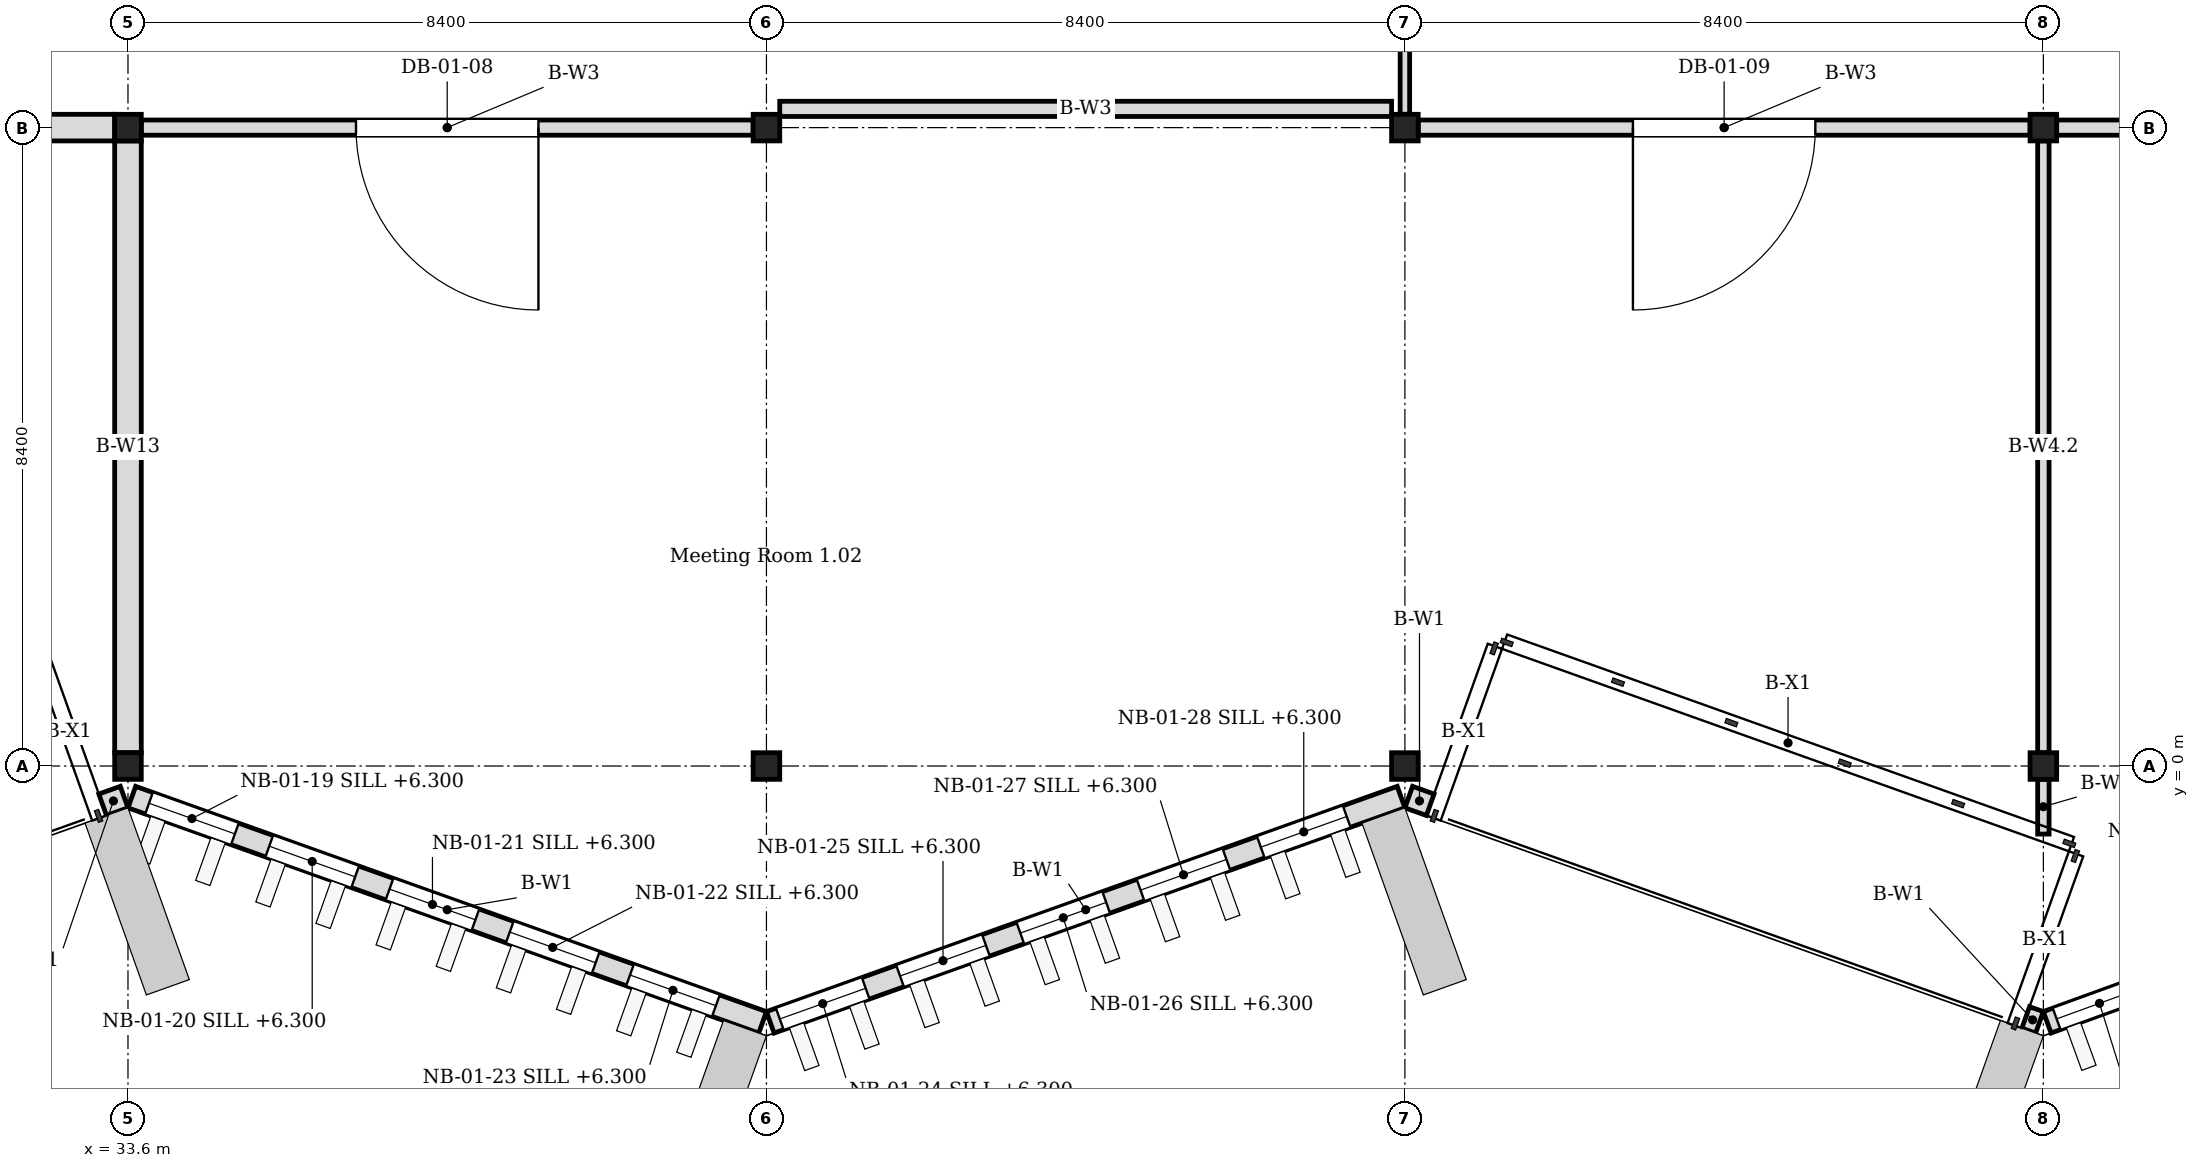
"""IFC4 building model, lengths in metres.
Left out: names, types, materials, properties, quantities, classifications, styles, units other than length and angle.
Written with IfcOpenShell. Run it as: python <this file> out.ifc"""

import sys

from ifc_helpers import new_model, si_unit, direction, frame, frame_2d, origin, origin_2d, place, context, subcontext, project, spatial, rectangle, i_section, extrude, element, fill, save


model = new_model("IFC4")
c1 = context("Model", 3, precision=1e-05, world=origin(), true_north=direction((0.0, 1.0)))
c2 = subcontext(c1, "Body", "Model", "MODEL_VIEW")
j1 = project(units=[si_unit("LENGTHUNIT", "METRE"), si_unit("PLANEANGLEUNIT", "RADIAN")], contexts=[c1])
p1 = place(None, origin())
s1 = spatial("IfcSite", under=j1, at=p1, CompositionType="ELEMENT")
p2 = place(p1, origin())
s2 = spatial("IfcBuilding", under=s1, at=p2, CompositionType="ELEMENT")
p3 = place(p2, frame((0.0, 0.0, 6.0)))
s3 = spatial("IfcBuildingStorey", under=s2, at=p3, CompositionType="ELEMENT", Elevation=6.0)
for number, where, z_axis, x_axis in (
    (1, (33.6, 0.0, 0.0), (0.0, 0.0, 1.0), (1.0, 0.0, 0.0)),
    (2, (33.6, 8.4, 0.0), (0.0, 0.0, 1.0), (1.0, 0.0, 0.0)),
    (3, (42.0, 0.0, 0.0), (0.0, 0.0, 1.0), (1.0, 0.0, 0.0)),
    (4, (42.0, 8.4, 0.0), (0.0, 0.0, 1.0), (1.0, 0.0, 0.0)),
    (5, (50.4, 0.0, 0.0), (0.0, 0.0, 1.0), (1.0, 0.0, 0.0)),
    (6, (50.4, 8.4, 0.0), (0.0, 0.0, 1.0), (1.0, 0.0, 0.0)),
    (7, (58.8, 0.0, 0.0), (0.0, 0.0, 1.0), (1.0, 0.0, 0.0)),
    (8, (58.8, 8.4, 0.0), (0.0, 0.0, 1.0), (1.0, 0.0, 0.0)),
):
    element("IfcColumn", number, at=place(p3, frame(where, z_axis=z_axis, x_axis=x_axis)), inside=s3, PredefinedType="COLUMN", context=c2, shape_type="SweptSolid", body=[
        extrude(i_section(OverallWidth=0.35, OverallDepth=0.35, WebThickness=0.012, FlangeThickness=0.019, FilletRadius=0.013, at=origin_2d()), origin(), (0.0, 0.0, 1.0), 4.2),
    ])
p4 = place(p3, frame((33.267, -0.51, 0.0), z_axis=(0.0, 0.0, 1.0), x_axis=(0.941797147708, 0.336181695768, 0.0)))
e9 = element("IfcWall", 9, at=p4, inside=s3, PredefinedType="SOLIDWALL", context=c2, shape_type="SweptSolid", body=[
    extrude(rectangle(XDim=0.3, YDim=0.3, at=frame_2d((0.15, 0.0))), origin(), (0.0, 0.0, 1.0), 4.05),
])
p5 = place(p3, frame((33.65, -0.409, 0.0), z_axis=(0.0, 0.0, 1.0), x_axis=(0.941736270411, -0.336352191894, 0.0)))
e10 = element("IfcWall", 10, at=p5, inside=s3, PredefinedType="SOLIDWALL", context=c2, shape_type="SweptSolid", body=[
    extrude(rectangle(XDim=8.812, YDim=0.3, at=frame_2d((4.406, 0.0))), origin(), (0.0, 0.0, 1.0), 4.05),
])
p6 = place(p5, frame((0.24, 0.0, 0.3)))
e11 = element("IfcOpeningElement", 11, at=p6, cuts=e10, PredefinedType="OPENING", context=c2, shape_type="SweptSolid", body=[
    extrude(rectangle(XDim=1.2, YDim=3.3, at=frame_2d((0.6, 1.65))), frame((0.0, 0.16, 0.0), z_axis=(0.0, -1.0, 0.0), x_axis=(1.0, 0.0, 0.0)), (0.0, 0.0, 1.0), 0.32),
])
p7 = place(p5, frame((1.92, 0.0, 0.3)))
e12 = element("IfcOpeningElement", 12, at=p7, cuts=e10, PredefinedType="OPENING", context=c2, shape_type="SweptSolid", body=[
    extrude(rectangle(XDim=1.2, YDim=3.3, at=frame_2d((0.6, 1.65))), frame((0.0, 0.16, 0.0), z_axis=(0.0, -1.0, 0.0), x_axis=(1.0, 0.0, 0.0)), (0.0, 0.0, 1.0), 0.32),
])
p8 = place(p5, frame((3.6, 0.0, 0.3)))
e13 = element("IfcOpeningElement", 13, at=p8, cuts=e10, PredefinedType="OPENING", context=c2, shape_type="SweptSolid", body=[
    extrude(rectangle(XDim=1.2, YDim=3.3, at=frame_2d((0.6, 1.65))), frame((0.0, 0.16, 0.0), z_axis=(0.0, -1.0, 0.0), x_axis=(1.0, 0.0, 0.0)), (0.0, 0.0, 1.0), 0.32),
])
p9 = place(p5, frame((5.28, 0.0, 0.3)))
e14 = element("IfcOpeningElement", 14, at=p9, cuts=e10, PredefinedType="OPENING", context=c2, shape_type="SweptSolid", body=[
    extrude(rectangle(XDim=1.2, YDim=3.3, at=frame_2d((0.6, 1.65))), frame((0.0, 0.16, 0.0), z_axis=(0.0, -1.0, 0.0), x_axis=(1.0, 0.0, 0.0)), (0.0, 0.0, 1.0), 0.32),
])
p10 = place(p5, frame((6.96, 0.0, 0.3)))
e15 = element("IfcOpeningElement", 15, at=p10, cuts=e10, PredefinedType="OPENING", context=c2, shape_type="SweptSolid", body=[
    extrude(rectangle(XDim=1.2, YDim=3.3, at=frame_2d((0.6, 1.65))), frame((0.0, 0.16, 0.0), z_axis=(0.0, -1.0, 0.0), x_axis=(1.0, 0.0, 0.0)), (0.0, 0.0, 1.0), 0.32),
])
p11 = place(p3, frame((42.051, -3.373, 0.0), z_axis=(0.0, 0.0, 1.0), x_axis=(0.941736270411, 0.336352191894, 0.0)))
e16 = element("IfcWall", 16, at=p11, inside=s3, PredefinedType="SOLIDWALL", context=c2, shape_type="SweptSolid", body=[
    extrude(rectangle(XDim=8.812, YDim=0.3, at=frame_2d((4.406, 0.0))), origin(), (0.0, 0.0, 1.0), 4.05),
])
p12 = place(p11, frame((0.133, 0.0, 0.3)))
e17 = element("IfcOpeningElement", 17, at=p12, cuts=e16, PredefinedType="OPENING", context=c2, shape_type="SweptSolid", body=[
    extrude(rectangle(XDim=1.2, YDim=3.3, at=frame_2d((0.6, 1.65))), frame((0.0, 0.16, 0.0), z_axis=(0.0, -1.0, 0.0), x_axis=(1.0, 0.0, 0.0)), (0.0, 0.0, 1.0), 0.32),
])
p13 = place(p11, frame((1.813, 0.0, 0.3)))
e18 = element("IfcOpeningElement", 18, at=p13, cuts=e16, PredefinedType="OPENING", context=c2, shape_type="SweptSolid", body=[
    extrude(rectangle(XDim=1.2, YDim=3.3, at=frame_2d((0.6, 1.65))), frame((0.0, 0.16, 0.0), z_axis=(0.0, -1.0, 0.0), x_axis=(1.0, 0.0, 0.0)), (0.0, 0.0, 1.0), 0.32),
])
p14 = place(p11, frame((3.493, 0.0, 0.3)))
e19 = element("IfcOpeningElement", 19, at=p14, cuts=e16, PredefinedType="OPENING", context=c2, shape_type="SweptSolid", body=[
    extrude(rectangle(XDim=1.2, YDim=3.3, at=frame_2d((0.6, 1.65))), frame((0.0, 0.16, 0.0), z_axis=(0.0, -1.0, 0.0), x_axis=(1.0, 0.0, 0.0)), (0.0, 0.0, 1.0), 0.32),
])
p15 = place(p11, frame((5.173, 0.0, 0.3)))
e20 = element("IfcOpeningElement", 20, at=p15, cuts=e16, PredefinedType="OPENING", context=c2, shape_type="SweptSolid", body=[
    extrude(rectangle(XDim=1.2, YDim=3.3, at=frame_2d((0.6, 1.65))), frame((0.0, 0.16, 0.0), z_axis=(0.0, -1.0, 0.0), x_axis=(1.0, 0.0, 0.0)), (0.0, 0.0, 1.0), 0.32),
])
p16 = place(p11, frame((6.853, 0.0, 0.3)))
e21 = element("IfcOpeningElement", 21, at=p16, cuts=e16, PredefinedType="OPENING", context=c2, shape_type="SweptSolid", body=[
    extrude(rectangle(XDim=1.2, YDim=3.3, at=frame_2d((0.6, 1.65))), frame((0.0, 0.16, 0.0), z_axis=(0.0, -1.0, 0.0), x_axis=(1.0, 0.0, 0.0)), (0.0, 0.0, 1.0), 0.32),
])
p17 = place(p3, frame((50.45, -0.409, 0.0), z_axis=(0.0, 0.0, 1.0), x_axis=(0.941797147708, -0.336181695768, 0.0)))
e22 = element("IfcWall", 22, at=p17, inside=s3, PredefinedType="SOLIDWALL", context=c2, shape_type="SweptSolid", body=[
    extrude(rectangle(XDim=0.3, YDim=0.3, at=frame_2d((0.15, 0.0))), origin(), (0.0, 0.0, 1.0), 4.05),
])
p18 = place(p3, frame((58.568, -3.308, 0.0), z_axis=(0.0, 0.0, 1.0), x_axis=(0.942000485661, -0.335611509061, 0.0)))
e23 = element("IfcWall", 23, at=p18, inside=s3, PredefinedType="SOLIDWALL", context=c2, shape_type="SweptSolid", body=[
    extrude(rectangle(XDim=0.192, YDim=0.3, at=frame_2d((0.096, 0.0))), origin(), (0.0, 0.0, 1.0), 4.05),
])
p19 = place(p3, frame((58.85, -3.372, 0.0), z_axis=(0.0, 0.0, 1.0), x_axis=(0.939953187971, 0.341303390584, 0.0)))
e24 = element("IfcWall", 24, at=p19, inside=s3, PredefinedType="SOLIDWALL", context=c2, shape_type="SweptSolid", body=[
    extrude(rectangle(XDim=8.828, YDim=0.3, at=frame_2d((4.414, 0.0))), origin(), (0.0, 0.0, 1.0), 4.05),
])
p20 = place(p19, frame((0.132, 0.0, 0.3)))
e25 = element("IfcOpeningElement", 25, at=p20, cuts=e24, PredefinedType="OPENING", context=c2, shape_type="SweptSolid", body=[
    extrude(rectangle(XDim=1.2, YDim=3.3, at=frame_2d((0.6, 1.65))), frame((0.0, 0.16, 0.0), z_axis=(0.0, -1.0, 0.0), x_axis=(1.0, 0.0, 0.0)), (0.0, 0.0, 1.0), 0.32),
])
p21 = place(p19, frame((1.812, 0.0, 0.3)))
e26 = element("IfcOpeningElement", 26, at=p21, cuts=e24, PredefinedType="OPENING", context=c2, shape_type="SweptSolid", body=[
    extrude(rectangle(XDim=1.2, YDim=3.3, at=frame_2d((0.6, 1.65))), frame((0.0, 0.16, 0.0), z_axis=(0.0, -1.0, 0.0), x_axis=(1.0, 0.0, 0.0)), (0.0, 0.0, 1.0), 0.32),
])
p22 = place(p19, frame((3.492, 0.0, 0.3)))
e27 = element("IfcOpeningElement", 27, at=p22, cuts=e24, PredefinedType="OPENING", context=c2, shape_type="SweptSolid", body=[
    extrude(rectangle(XDim=1.2, YDim=3.3, at=frame_2d((0.6, 1.65))), frame((0.0, 0.16, 0.0), z_axis=(0.0, -1.0, 0.0), x_axis=(1.0, 0.0, 0.0)), (0.0, 0.0, 1.0), 0.32),
])
p23 = place(p19, frame((5.172, 0.0, 0.3)))
e28 = element("IfcOpeningElement", 28, at=p23, cuts=e24, PredefinedType="OPENING", context=c2, shape_type="SweptSolid", body=[
    extrude(rectangle(XDim=1.2, YDim=3.3, at=frame_2d((0.6, 1.65))), frame((0.0, 0.16, 0.0), z_axis=(0.0, -1.0, 0.0), x_axis=(1.0, 0.0, 0.0)), (0.0, 0.0, 1.0), 0.32),
])
p24 = place(p19, frame((6.852, 0.0, 0.3)))
e29 = element("IfcOpeningElement", 29, at=p24, cuts=e24, PredefinedType="OPENING", context=c2, shape_type="SweptSolid", body=[
    extrude(rectangle(XDim=1.2, YDim=3.3, at=frame_2d((0.6, 1.65))), frame((0.0, 0.16, 0.0), z_axis=(0.0, -1.0, 0.0), x_axis=(1.0, 0.0, 0.0)), (0.0, 0.0, 1.0), 0.32),
])
p25 = place(p3, frame((25.375, 8.4, 0.0), z_axis=(0.0, 0.0, 1.0), x_axis=(1.0, 0.0, 0.0)))
e30 = element("IfcWall", 30, at=p25, inside=s3, PredefinedType="PARTITIONING", context=c2, shape_type="SweptSolid", body=[
    extrude(rectangle(XDim=8.05, YDim=0.35, at=frame_2d((4.025, 0.0))), origin(), (0.0, 0.0, 1.0), 3.35),
])
p26 = place(p25, frame((3.475, 0.0, 0.0)))
e31 = element("IfcOpeningElement", 31, at=p26, cuts=e30, PredefinedType="OPENING", context=c2, shape_type="SweptSolid", body=[
    extrude(rectangle(XDim=1.1, YDim=2.4, at=frame_2d((0.55, 1.2))), frame((0.0, 0.185, 0.0), z_axis=(0.0, -1.0, 0.0), x_axis=(1.0, 0.0, 0.0)), (0.0, 0.0, 1.0), 0.37),
])
p27 = place(p3, frame((33.775, 8.4, 0.0), z_axis=(0.0, 0.0, 1.0), x_axis=(1.0, 0.0, 0.0)))
e32 = element("IfcWall", 32, at=p27, inside=s3, PredefinedType="PARTITIONING", context=c2, shape_type="SweptSolid", body=[
    extrude(rectangle(XDim=8.05, YDim=0.2, at=frame_2d((4.025, 0.0))), origin(), (0.0, 0.0, 1.0), 3.35),
])
p28 = place(p27, frame((2.825, 0.0, 0.0)))
e33 = element("IfcOpeningElement", 33, at=p28, cuts=e32, PredefinedType="OPENING", context=c2, shape_type="SweptSolid", body=[
    extrude(rectangle(XDim=2.4, YDim=2.2, at=frame_2d((1.2, 1.1))), frame((0.0, 0.11, 0.0), z_axis=(0.0, -1.0, 0.0), x_axis=(1.0, 0.0, 0.0)), (0.0, 0.0, 1.0), 0.22),
])
p29 = place(p3, frame((42.175, 8.646, 0.0), z_axis=(0.0, 0.0, 1.0), x_axis=(1.0, 0.0, 0.0)))
e34 = element("IfcWall", 34, at=p29, inside=s3, PredefinedType="PARTITIONING", context=c2, shape_type="SweptSolid", body=[
    extrude(rectangle(XDim=8.05, YDim=0.2, at=frame_2d((4.025, 0.0))), origin(), (0.0, 0.0, 1.0), 3.35),
])
p30 = place(p3, frame((50.575, 8.4, 0.0), z_axis=(0.0, 0.0, 1.0), x_axis=(1.0, 0.0, 0.0)))
e35 = element("IfcWall", 35, at=p30, inside=s3, PredefinedType="PARTITIONING", context=c2, shape_type="SweptSolid", body=[
    extrude(rectangle(XDim=8.05, YDim=0.2, at=frame_2d((4.025, 0.0))), origin(), (0.0, 0.0, 1.0), 3.35),
])
p31 = place(p30, frame((2.825, 0.0, 0.0)))
e36 = element("IfcOpeningElement", 36, at=p31, cuts=e35, PredefinedType="OPENING", context=c2, shape_type="SweptSolid", body=[
    extrude(rectangle(XDim=2.4, YDim=2.2, at=frame_2d((1.2, 1.1))), frame((0.0, 0.11, 0.0), z_axis=(0.0, -1.0, 0.0), x_axis=(1.0, 0.0, 0.0)), (0.0, 0.0, 1.0), 0.22),
])
p32 = place(p3, frame((58.975, 8.4, 0.0), z_axis=(0.0, 0.0, 1.0), x_axis=(1.0, 0.0, 0.0)))
e37 = element("IfcWall", 37, at=p32, inside=s3, PredefinedType="PARTITIONING", context=c2, shape_type="SweptSolid", body=[
    extrude(rectangle(XDim=8.05, YDim=0.2, at=frame_2d((4.025, 0.0))), origin(), (0.0, 0.0, 1.0), 3.35),
])
p33 = place(p32, frame((3.525, 0.0, 0.0)))
e38 = element("IfcOpeningElement", 38, at=p33, cuts=e37, PredefinedType="OPENING", context=c2, shape_type="SweptSolid", body=[
    extrude(rectangle(XDim=1.0, YDim=2.1, at=frame_2d((0.5, 1.05))), frame((0.0, 0.11, 0.0), z_axis=(0.0, -1.0, 0.0), x_axis=(1.0, 0.0, 0.0)), (0.0, 0.0, 1.0), 0.22),
])
p34 = place(p3, frame((33.6, 0.175, 0.0), z_axis=(0.0, 0.0, 1.0), x_axis=(0.0, 1.0, 0.0)))
e39 = element("IfcWall", 39, at=p34, inside=s3, PredefinedType="PARTITIONING", context=c2, shape_type="SweptSolid", body=[
    extrude(rectangle(XDim=8.05, YDim=0.35, at=frame_2d((4.025, 0.0))), origin(), (0.0, 0.0, 1.0), 3.35),
])
p35 = place(p3, frame((50.4, 8.575, 0.0), z_axis=(0.0, 0.0, 1.0), x_axis=(0.0, 1.0, 0.0)))
e40 = element("IfcWall", 40, at=p35, inside=s3, PredefinedType="PARTITIONING", context=c2, shape_type="SweptSolid", body=[
    extrude(rectangle(XDim=8.05, YDim=0.125, at=frame_2d((4.025, 0.0))), origin(), (0.0, 0.0, 1.0), 3.35),
])
p36 = place(p35, frame((2.825, 0.0, 0.0)))
e41 = element("IfcOpeningElement", 41, at=p36, cuts=e40, PredefinedType="OPENING", context=c2, shape_type="SweptSolid", body=[
    extrude(rectangle(XDim=2.4, YDim=2.2, at=frame_2d((1.2, 1.1))), frame((0.0, 0.073, 0.0), z_axis=(0.0, -1.0, 0.0), x_axis=(1.0, 0.0, 0.0)), (0.0, 0.0, 1.0), 0.145),
])
p37 = place(p3, frame((58.8, -0.895, 0.0), z_axis=(0.0, 0.0, 1.0), x_axis=(0.0, 1.0, 0.0)))
e42 = element("IfcWall", 42, at=p37, inside=s3, PredefinedType="PARTITIONING", context=c2, shape_type="SweptSolid", body=[
    extrude(rectangle(XDim=0.72, YDim=0.15, at=frame_2d((0.36, 0.0))), origin(), (0.0, 0.0, 1.0), 3.35),
])
p38 = place(p3, frame((58.8, 0.175, 0.0), z_axis=(0.0, 0.0, 1.0), x_axis=(0.0, 1.0, 0.0)))
e43 = element("IfcWall", 43, at=p38, inside=s3, PredefinedType="PARTITIONING", context=c2, shape_type="SweptSolid", body=[
    extrude(rectangle(XDim=8.05, YDim=0.15, at=frame_2d((4.025, 0.0))), origin(), (0.0, 0.0, 1.0), 3.35),
])
p39 = place(p6, origin())
e44 = element("IfcWindow", 44, at=p39, inside=s3, PartitioningType="TRIPLE_PANEL_VERTICAL", PredefinedType="WINDOW", context=c2, shape_type="SweptSolid", body=[
    extrude(rectangle(XDim=1.2, YDim=3.3, at=frame_2d((0.6, 1.65))), frame((0.0, 0.03, 0.0), z_axis=(0.0, -1.0, 0.0), x_axis=(1.0, 0.0, 0.0)), (0.0, 0.0, 1.0), 0.06),
])
fill(e11, e44)
p40 = place(p7, origin())
e45 = element("IfcWindow", 45, at=p40, inside=s3, PartitioningType="TRIPLE_PANEL_VERTICAL", PredefinedType="WINDOW", context=c2, shape_type="SweptSolid", body=[
    extrude(rectangle(XDim=1.2, YDim=3.3, at=frame_2d((0.6, 1.65))), frame((0.0, 0.03, 0.0), z_axis=(0.0, -1.0, 0.0), x_axis=(1.0, 0.0, 0.0)), (0.0, 0.0, 1.0), 0.06),
])
fill(e12, e45)
p41 = place(p8, origin())
e46 = element("IfcWindow", 46, at=p41, inside=s3, PartitioningType="TRIPLE_PANEL_VERTICAL", PredefinedType="WINDOW", context=c2, shape_type="SweptSolid", body=[
    extrude(rectangle(XDim=1.2, YDim=3.3, at=frame_2d((0.6, 1.65))), frame((0.0, 0.03, 0.0), z_axis=(0.0, -1.0, 0.0), x_axis=(1.0, 0.0, 0.0)), (0.0, 0.0, 1.0), 0.06),
])
fill(e13, e46)
p42 = place(p9, origin())
e47 = element("IfcWindow", 47, at=p42, inside=s3, PartitioningType="TRIPLE_PANEL_VERTICAL", PredefinedType="WINDOW", context=c2, shape_type="SweptSolid", body=[
    extrude(rectangle(XDim=1.2, YDim=3.3, at=frame_2d((0.6, 1.65))), frame((0.0, 0.03, 0.0), z_axis=(0.0, -1.0, 0.0), x_axis=(1.0, 0.0, 0.0)), (0.0, 0.0, 1.0), 0.06),
])
fill(e14, e47)
p43 = place(p10, origin())
e48 = element("IfcWindow", 48, at=p43, inside=s3, PartitioningType="TRIPLE_PANEL_VERTICAL", PredefinedType="WINDOW", context=c2, shape_type="SweptSolid", body=[
    extrude(rectangle(XDim=1.2, YDim=3.3, at=frame_2d((0.6, 1.65))), frame((0.0, 0.03, 0.0), z_axis=(0.0, -1.0, 0.0), x_axis=(1.0, 0.0, 0.0)), (0.0, 0.0, 1.0), 0.06),
])
fill(e15, e48)
p44 = place(p12, origin())
e49 = element("IfcWindow", 49, at=p44, inside=s3, PartitioningType="TRIPLE_PANEL_VERTICAL", PredefinedType="WINDOW", context=c2, shape_type="SweptSolid", body=[
    extrude(rectangle(XDim=1.2, YDim=3.3, at=frame_2d((0.6, 1.65))), frame((0.0, 0.03, 0.0), z_axis=(0.0, -1.0, 0.0), x_axis=(1.0, 0.0, 0.0)), (0.0, 0.0, 1.0), 0.06),
])
fill(e17, e49)
p45 = place(p13, origin())
e50 = element("IfcWindow", 50, at=p45, inside=s3, PartitioningType="TRIPLE_PANEL_VERTICAL", PredefinedType="WINDOW", context=c2, shape_type="SweptSolid", body=[
    extrude(rectangle(XDim=1.2, YDim=3.3, at=frame_2d((0.6, 1.65))), frame((0.0, 0.03, 0.0), z_axis=(0.0, -1.0, 0.0), x_axis=(1.0, 0.0, 0.0)), (0.0, 0.0, 1.0), 0.06),
])
fill(e18, e50)
p46 = place(p14, origin())
e51 = element("IfcWindow", 51, at=p46, inside=s3, PartitioningType="TRIPLE_PANEL_VERTICAL", PredefinedType="WINDOW", context=c2, shape_type="SweptSolid", body=[
    extrude(rectangle(XDim=1.2, YDim=3.3, at=frame_2d((0.6, 1.65))), frame((0.0, 0.03, 0.0), z_axis=(0.0, -1.0, 0.0), x_axis=(1.0, 0.0, 0.0)), (0.0, 0.0, 1.0), 0.06),
])
fill(e19, e51)
p47 = place(p15, origin())
e52 = element("IfcWindow", 52, at=p47, inside=s3, PartitioningType="TRIPLE_PANEL_VERTICAL", PredefinedType="WINDOW", context=c2, shape_type="SweptSolid", body=[
    extrude(rectangle(XDim=1.2, YDim=3.3, at=frame_2d((0.6, 1.65))), frame((0.0, 0.03, 0.0), z_axis=(0.0, -1.0, 0.0), x_axis=(1.0, 0.0, 0.0)), (0.0, 0.0, 1.0), 0.06),
])
fill(e20, e52)
p48 = place(p16, origin())
e53 = element("IfcWindow", 53, at=p48, inside=s3, PartitioningType="TRIPLE_PANEL_VERTICAL", PredefinedType="WINDOW", context=c2, shape_type="SweptSolid", body=[
    extrude(rectangle(XDim=1.2, YDim=3.3, at=frame_2d((0.6, 1.65))), frame((0.0, 0.03, 0.0), z_axis=(0.0, -1.0, 0.0), x_axis=(1.0, 0.0, 0.0)), (0.0, 0.0, 1.0), 0.06),
])
fill(e21, e53)
p49 = place(p20, origin())
e54 = element("IfcWindow", 54, at=p49, inside=s3, PartitioningType="TRIPLE_PANEL_VERTICAL", PredefinedType="WINDOW", context=c2, shape_type="SweptSolid", body=[
    extrude(rectangle(XDim=1.2, YDim=3.3, at=frame_2d((0.6, 1.65))), frame((0.0, 0.03, 0.0), z_axis=(0.0, -1.0, 0.0), x_axis=(1.0, 0.0, 0.0)), (0.0, 0.0, 1.0), 0.06),
])
fill(e25, e54)
p50 = place(p28, origin())
e55 = element("IfcDoor", 55, at=p50, inside=s3, OperationType="DOUBLE_DOOR_SINGLE_SWING", PredefinedType="DOOR", context=c2, shape_type="SweptSolid", body=[
    extrude(rectangle(XDim=2.4, YDim=2.2, at=frame_2d((1.2, 1.1))), frame((0.0, 0.025, 0.0), z_axis=(0.0, -1.0, 0.0), x_axis=(1.0, 0.0, 0.0)), (0.0, 0.0, 1.0), 0.05),
])
fill(e33, e55)
p51 = place(p31, origin())
e56 = element("IfcDoor", 56, at=p51, inside=s3, OperationType="DOUBLE_DOOR_SINGLE_SWING", PredefinedType="DOOR", context=c2, shape_type="SweptSolid", body=[
    extrude(rectangle(XDim=2.4, YDim=2.2, at=frame_2d((1.2, 1.1))), frame((0.0, 0.025, 0.0), z_axis=(0.0, -1.0, 0.0), x_axis=(1.0, 0.0, 0.0)), (0.0, 0.0, 1.0), 0.05),
])
fill(e36, e56)
save(model, sys.argv[1])
